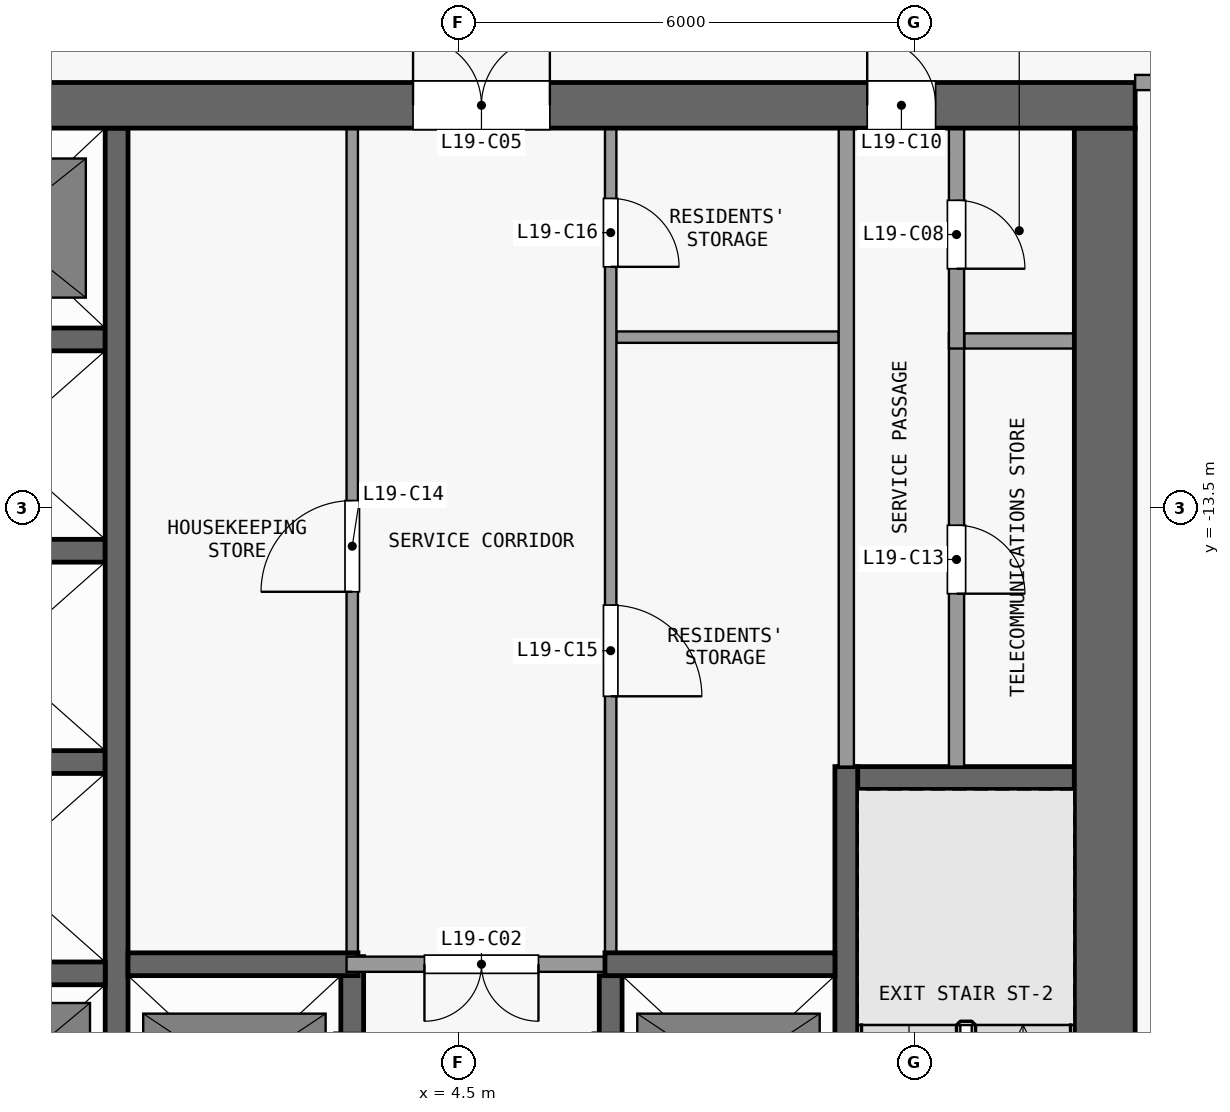
"""IFC4 building model, lengths in metres.
Left out: names, types, materials, properties, quantities, classifications, styles, units other than length and angle.
Written with IfcOpenShell. Run it as: python <this file> out.ifc"""

import sys

from ifc_helpers import new_model, si_unit, direction, frame, frame_2d, origin, place, context, subcontext, project, spatial, rectangle, extrude, element, fill, save


model = new_model("IFC4")
c1 = context("Model", 3, precision=1e-05, world=origin(), true_north=direction((0.0, 1.0)))
c2 = subcontext(c1, "Body", "Model", "MODEL_VIEW")
j1 = project(units=[si_unit("LENGTHUNIT", "METRE"), si_unit("PLANEANGLEUNIT", "RADIAN")], contexts=[c1])
p1 = place(None, origin())
s1 = spatial("IfcSite", under=j1, at=p1, CompositionType="ELEMENT")
p2 = place(p1, origin())
s2 = spatial("IfcBuilding", under=s1, at=p2, CompositionType="ELEMENT")
p3 = place(p2, frame((0.0, 0.0, 81.1)))
s3 = spatial("IfcBuildingStorey", under=s2, at=p3, CompositionType="ELEMENT", Elevation=81.1)
p4 = place(p3, frame((-13.4, -8.2, 0.0), z_axis=(0.0, 0.0, 1.0), x_axis=(1.0, 0.0, 0.0)))
e1 = element("IfcWall", 1, at=p4, inside=s3, PredefinedType="SHEAR", context=c2, shape_type="SweptSolid", body=[
    extrude(rectangle(XDim=26.8, YDim=0.6, at=frame_2d((13.4, 0.0))), origin(), (0.0, 0.0, 1.0), 3.3),
])
p5 = place(p4, frame((7.7, 0.0, 0.0)))
e2 = element("IfcOpeningElement", 2, at=p5, cuts=e1, PredefinedType="OPENING", context=c2, shape_type="SweptSolid", body=[
    extrude(rectangle(XDim=1.8, YDim=2.1, at=frame_2d((0.9, 1.05))), frame((0.0, 0.31, 0.0), z_axis=(0.0, -1.0, 0.0), x_axis=(1.0, 0.0, 0.0)), (0.0, 0.0, 1.0), 0.62),
])
p6 = place(p4, frame((17.3, 0.0, 0.0)))
e3 = element("IfcOpeningElement", 3, at=p6, cuts=e1, PredefinedType="OPENING", context=c2, shape_type="SweptSolid", body=[
    extrude(rectangle(XDim=1.8, YDim=2.1, at=frame_2d((0.9, 1.05))), frame((0.0, 0.31, 0.0), z_axis=(0.0, -1.0, 0.0), x_axis=(1.0, 0.0, 0.0)), (0.0, 0.0, 1.0), 0.62),
])
p7 = place(p4, frame((2.625, 0.0, 0.0)))
e4 = element("IfcOpeningElement", 4, at=p7, cuts=e1, PredefinedType="OPENING", context=c2, shape_type="SweptSolid", body=[
    extrude(rectangle(XDim=0.9, YDim=2.1, at=frame_2d((0.45, 1.05))), frame((0.0, 0.31, 0.0), z_axis=(0.0, -1.0, 0.0), x_axis=(1.0, 0.0, 0.0)), (0.0, 0.0, 1.0), 0.62),
])
p8 = place(p4, frame((23.275, 0.0, 0.0)))
e5 = element("IfcOpeningElement", 5, at=p8, cuts=e1, PredefinedType="OPENING", context=c2, shape_type="SweptSolid", body=[
    extrude(rectangle(XDim=0.9, YDim=2.1, at=frame_2d((0.45, 1.05))), frame((0.0, 0.31, 0.0), z_axis=(0.0, -1.0, 0.0), x_axis=(1.0, 0.0, 0.0)), (0.0, 0.0, 1.0), 0.62),
])
p9 = place(p3, frame((13.0, -24.6, 0.0), z_axis=(0.0, 0.0, 1.0), x_axis=(0.0, 1.0, 0.0)))
e6 = element("IfcWall", 6, at=p9, inside=s3, PredefinedType="SHEAR", context=c2, shape_type="SweptSolid", body=[
    extrude(rectangle(XDim=16.1, YDim=0.8, at=frame_2d((8.05, 0.0))), origin(), (0.0, 0.0, 1.0), 3.3),
])
p10 = place(p3, frame((-2.95, -19.62, 0.0), z_axis=(0.0, 0.0, 1.0), x_axis=(1.0, 0.0, 0.0)))
e7 = element("IfcWall", 7, at=p10, inside=s3, PredefinedType="SHEAR", context=c2, shape_type="SweptSolid", body=[
    extrude(rectangle(XDim=2.8, YDim=0.3, at=frame_2d((1.4, 0.0))), origin(), (0.0, 0.0, 1.0), 3.3),
])
p11 = place(p3, frame((0.15, -19.5, 0.0), z_axis=(0.0, 0.0, 1.0), x_axis=(1.0, 0.0, 0.0)))
e8 = element("IfcWall", 8, at=p11, inside=s3, PredefinedType="SHEAR", context=c2, shape_type="SweptSolid", body=[
    extrude(rectangle(XDim=3.025, YDim=0.3, at=frame_2d((1.513, 0.0))), origin(), (0.0, 0.0, 1.0), 3.3),
])
p12 = place(p3, frame((6.575, -19.5, 0.0), z_axis=(0.0, 0.0, 1.0), x_axis=(-1.0, 0.0, 0.0)))
e9 = element("IfcWall", 9, at=p12, inside=s3, PredefinedType="PARTITIONING", context=c2, shape_type="SweptSolid", body=[
    extrude(rectangle(XDim=3.55, YDim=0.2, at=frame_2d((1.775, 0.0))), origin(), (0.0, 0.0, 1.0), 3.3),
])
p13 = place(p12, frame((1.025, 0.0, 0.0)))
e10 = element("IfcOpeningElement", 10, at=p13, cuts=e9, PredefinedType="OPENING", context=c2, shape_type="SweptSolid", body=[
    extrude(rectangle(XDim=1.5, YDim=2.1, at=frame_2d((0.75, 1.05))), frame((0.0, 0.11, 0.0), z_axis=(0.0, -1.0, 0.0), x_axis=(1.0, 0.0, 0.0)), (0.0, 0.0, 1.0), 0.22),
])
p14 = place(p3, frame((6.425, -19.5, 0.0), z_axis=(0.0, 0.0, 1.0), x_axis=(1.0, 0.0, 0.0)))
e11 = element("IfcWall", 11, at=p14, inside=s3, PredefinedType="SHEAR", context=c2, shape_type="SweptSolid", body=[
    extrude(rectangle(XDim=3.025, YDim=0.3, at=frame_2d((1.512, 0.0))), origin(), (0.0, 0.0, 1.0), 3.3),
])
p15 = place(p3, frame((9.5, -17.05, 0.0), z_axis=(0.0, 0.0, 1.0), x_axis=(1.0, 0.0, 0.0)))
e12 = element("IfcWall", 12, at=p15, inside=s3, PredefinedType="SHEAR", context=c2, shape_type="SweptSolid", body=[
    extrude(rectangle(XDim=3.1, YDim=0.3, at=frame_2d((1.55, 0.0))), origin(), (0.0, 0.0, 1.0), 3.3),
])
for number, where, z_axis, x_axis in (
    (13, (-2.95, -16.84, 0.0), (0.0, 0.0, 1.0), (1.0, 0.0, 0.0)),
    (14, (-2.95, -14.06, 0.0), (0.0, 0.0, 1.0), (1.0, 0.0, 0.0)),
):
    element("IfcWall", number, at=place(p3, frame(where, z_axis=z_axis, x_axis=x_axis)), inside=s3, PredefinedType="SHEAR", context=c2, shape_type="SweptSolid", body=[
        extrude(rectangle(XDim=2.8, YDim=0.3, at=frame_2d((1.4, 0.0))), origin(), (0.0, 0.0, 1.0), 3.3),
    ])
p16 = place(p3, frame((11.15, -11.3, 0.0), z_axis=(0.0, 0.0, 1.0), x_axis=(1.0, 0.0, 0.0)))
e15 = element("IfcWall", 15, at=p16, inside=s3, PredefinedType="PARTITIONING", context=c2, shape_type="SweptSolid", body=[
    extrude(rectangle(XDim=1.45, YDim=0.2, at=frame_2d((0.725, 0.0))), origin(), (0.0, 0.0, 1.0), 3.3),
])
p17 = place(p3, frame((-2.95, -11.28, 0.0), z_axis=(0.0, 0.0, 1.0), x_axis=(1.0, 0.0, 0.0)))
e16 = element("IfcWall", 16, at=p17, inside=s3, PredefinedType="SHEAR", context=c2, shape_type="SweptSolid", body=[
    extrude(rectangle(XDim=2.8, YDim=0.3, at=frame_2d((1.4, 0.0))), origin(), (0.0, 0.0, 1.0), 3.3),
])
p18 = place(p3, frame((6.575, -11.25, 0.0), z_axis=(0.0, 0.0, 1.0), x_axis=(1.0, 0.0, 0.0)))
e17 = element("IfcWall", 17, at=p18, inside=s3, PredefinedType="PARTITIONING", context=c2, shape_type="SweptSolid", body=[
    extrude(rectangle(XDim=2.925, YDim=0.15, at=frame_2d((1.462, 0.0))), origin(), (0.0, 0.0, 1.0), 3.3),
])
p19 = place(p3, frame((0.0, -22.25, 0.0), z_axis=(0.0, 0.0, 1.0), x_axis=(0.0, 1.0, 0.0)))
e18 = element("IfcWall", 18, at=p19, inside=s3, PredefinedType="SHEAR", context=c2, shape_type="SweptSolid", body=[
    extrude(rectangle(XDim=13.75, YDim=0.3, at=frame_2d((6.875, 0.0))), origin(), (0.0, 0.0, 1.0), 3.3),
])
p20 = place(p3, frame((3.1, -22.25, 0.0), z_axis=(0.0, 0.0, 1.0), x_axis=(0.0, 1.0, 0.0)))
e19 = element("IfcWall", 19, at=p20, inside=s3, PredefinedType="SHEAR", context=c2, shape_type="SweptSolid", body=[
    extrude(rectangle(XDim=2.85, YDim=0.3, at=frame_2d((1.425, 0.0))), origin(), (0.0, 0.0, 1.0), 3.3),
])
p21 = place(p20, frame((0.75, 0.0, 0.0)))
e20 = element("IfcOpeningElement", 20, at=p21, cuts=e19, PredefinedType="OPENING", context=c2, shape_type="SweptSolid", body=[
    extrude(rectangle(XDim=1.1, YDim=2.1, at=frame_2d((0.55, 1.05))), frame((0.0, 0.16, 0.0), z_axis=(0.0, -1.0, 0.0), x_axis=(1.0, 0.0, 0.0)), (0.0, 0.0, 1.0), 0.32),
])
p22 = place(p3, frame((3.1, -19.4, 0.0), z_axis=(0.0, 0.0, 1.0), x_axis=(0.0, 1.0, 0.0)))
e21 = element("IfcWall", 21, at=p22, inside=s3, PredefinedType="PARTITIONING", context=c2, shape_type="SweptSolid", body=[
    extrude(rectangle(XDim=10.9, YDim=0.15, at=frame_2d((5.45, 0.0))), origin(), (0.0, 0.0, 1.0), 3.3),
])
p23 = place(p22, frame((4.8, 0.0, 0.0)))
e22 = element("IfcOpeningElement", 22, at=p23, cuts=e21, PredefinedType="OPENING", context=c2, shape_type="SweptSolid", body=[
    extrude(rectangle(XDim=1.2, YDim=2.1, at=frame_2d((0.6, 1.05))), frame((0.0, 0.085, 0.0), z_axis=(0.0, -1.0, 0.0), x_axis=(1.0, 0.0, 0.0)), (0.0, 0.0, 1.0), 0.17),
])
p24 = place(p3, frame((6.5, -22.25, 0.0), z_axis=(0.0, 0.0, 1.0), x_axis=(0.0, 1.0, 0.0)))
e23 = element("IfcWall", 23, at=p24, inside=s3, PredefinedType="SHEAR", context=c2, shape_type="SweptSolid", body=[
    extrude(rectangle(XDim=2.6, YDim=0.3, at=frame_2d((1.3, 0.0))), origin(), (0.0, 0.0, 1.0), 3.3),
])
p25 = place(p24, frame((0.75, 0.0, 0.0)))
e24 = element("IfcOpeningElement", 24, at=p25, cuts=e23, PredefinedType="OPENING", context=c2, shape_type="SweptSolid", body=[
    extrude(rectangle(XDim=1.1, YDim=2.1, at=frame_2d((0.55, 1.05))), frame((0.0, 0.16, 0.0), z_axis=(0.0, -1.0, 0.0), x_axis=(1.0, 0.0, 0.0)), (0.0, 0.0, 1.0), 0.32),
])
p26 = place(p3, frame((6.5, -8.5, 0.0), z_axis=(0.0, 0.0, 1.0), x_axis=(0.0, -1.0, 0.0)))
e25 = element("IfcWall", 25, at=p26, inside=s3, PredefinedType="PARTITIONING", context=c2, shape_type="SweptSolid", body=[
    extrude(rectangle(XDim=10.85, YDim=0.15, at=frame_2d((5.425, 0.0))), origin(), (0.0, 0.0, 1.0), 3.3),
])
p27 = place(p26, frame((6.275, 0.0, 0.0)))
e26 = element("IfcOpeningElement", 26, at=p27, cuts=e25, PredefinedType="OPENING", context=c2, shape_type="SweptSolid", body=[
    extrude(rectangle(XDim=1.2, YDim=2.1, at=frame_2d((0.6, 1.05))), frame((0.0, 0.085, 0.0), z_axis=(0.0, -1.0, 0.0), x_axis=(1.0, 0.0, 0.0)), (0.0, 0.0, 1.0), 0.17),
])
p28 = place(p26, frame((0.925, 0.0, 0.0)))
e27 = element("IfcOpeningElement", 27, at=p28, cuts=e25, PredefinedType="OPENING", context=c2, shape_type="SweptSolid", body=[
    extrude(rectangle(XDim=0.9, YDim=2.1, at=frame_2d((0.45, 1.05))), frame((0.0, 0.085, 0.0), z_axis=(0.0, -1.0, 0.0), x_axis=(1.0, 0.0, 0.0)), (0.0, 0.0, 1.0), 0.17),
])
p29 = place(p3, frame((9.6, -16.9, 0.0), z_axis=(0.0, 0.0, 1.0), x_axis=(0.0, -1.0, 0.0)))
e28 = element("IfcWall", 28, at=p29, inside=s3, PredefinedType="SHEAR", context=c2, shape_type="SweptSolid", body=[
    extrude(rectangle(XDim=7.7, YDim=0.3, at=frame_2d((3.85, 0.0))), origin(), (0.0, 0.0, 1.0), 3.3),
])
p30 = place(p29, frame((6.5, 0.0, 0.0)))
e29 = element("IfcOpeningElement", 29, at=p30, cuts=e28, PredefinedType="OPENING", context=c2, shape_type="SweptSolid", body=[
    extrude(rectangle(XDim=1.1, YDim=2.1, at=frame_2d((0.55, 1.05))), frame((0.0, 0.16, 0.0), z_axis=(0.0, -1.0, 0.0), x_axis=(1.0, 0.0, 0.0)), (0.0, 0.0, 1.0), 0.32),
])
p31 = place(p3, frame((9.6, -16.9, 0.0), z_axis=(0.0, 0.0, 1.0), x_axis=(0.0, 1.0, 0.0)))
e30 = element("IfcWall", 30, at=p31, inside=s3, PredefinedType="PARTITIONING", context=c2, shape_type="SweptSolid", body=[
    extrude(rectangle(XDim=8.4, YDim=0.2, at=frame_2d((4.2, 0.0))), origin(), (0.0, 0.0, 1.0), 3.3),
])
p32 = place(p3, frame((11.05, -11.2, 0.0), z_axis=(0.0, 0.0, 1.0), x_axis=(0.0, -1.0, 0.0)))
e31 = element("IfcWall", 31, at=p32, inside=s3, PredefinedType="PARTITIONING", context=c2, shape_type="SweptSolid", body=[
    extrude(rectangle(XDim=5.7, YDim=0.2, at=frame_2d((2.85, 0.0))), origin(), (0.0, 0.0, 1.0), 3.3),
])
p33 = place(p32, frame((2.525, 0.0, 0.0)))
e32 = element("IfcOpeningElement", 32, at=p33, cuts=e31, PredefinedType="OPENING", context=c2, shape_type="SweptSolid", body=[
    extrude(rectangle(XDim=0.9, YDim=2.1, at=frame_2d((0.45, 1.05))), frame((0.0, 0.11, 0.0), z_axis=(0.0, -1.0, 0.0), x_axis=(1.0, 0.0, 0.0)), (0.0, 0.0, 1.0), 0.22),
])
p34 = place(p3, frame((11.05, -8.5, 0.0), z_axis=(0.0, 0.0, 1.0), x_axis=(0.0, -1.0, 0.0)))
e33 = element("IfcWall", 33, at=p34, inside=s3, PredefinedType="PARTITIONING", context=c2, shape_type="SweptSolid", body=[
    extrude(rectangle(XDim=2.9, YDim=0.2, at=frame_2d((1.45, 0.0))), origin(), (0.0, 0.0, 1.0), 3.3),
])
p35 = place(p34, frame((0.95, 0.0, 0.0)))
e34 = element("IfcOpeningElement", 34, at=p35, cuts=e33, PredefinedType="OPENING", context=c2, shape_type="SweptSolid", body=[
    extrude(rectangle(XDim=0.9, YDim=2.1, at=frame_2d((0.45, 1.05))), frame((0.0, 0.11, 0.0), z_axis=(0.0, -1.0, 0.0), x_axis=(1.0, 0.0, 0.0)), (0.0, 0.0, 1.0), 0.22),
])
p36 = place(p3, frame((13.4, -7.9, 0.0), z_axis=(0.0, 0.0, 1.0), x_axis=(1.0, 0.0, 0.0)))
e35 = element("IfcWall", 35, at=p36, inside=s3, PredefinedType="PARTITIONING", context=c2, shape_type="SweptSolid", body=[
    extrude(rectangle(XDim=10.45, YDim=0.2, at=frame_2d((5.225, 0.0))), origin(), (0.0, 0.0, 1.0), 3.3),
])
p37 = place(p36, frame((1.0, 0.0, 0.0)))
e36 = element("IfcOpeningElement", 36, at=p37, cuts=e35, PredefinedType="OPENING", context=c2, shape_type="SweptSolid", body=[
    extrude(rectangle(XDim=1.0, YDim=2.1, at=frame_2d((0.5, 1.05))), frame((0.0, 0.11, 0.0), z_axis=(0.0, -1.0, 0.0), x_axis=(1.0, 0.0, 0.0)), (0.0, 0.0, 1.0), 0.22),
])
p38 = place(p13, origin())
e37 = element("IfcDoor", 37, at=p38, inside=s3, OperationType="DOUBLE_DOOR_SINGLE_SWING", PredefinedType="DOOR", context=c2, shape_type="SweptSolid", body=[
    extrude(rectangle(XDim=1.5, YDim=2.1, at=frame_2d((0.75, 1.05))), frame((0.0, 0.025, 0.0), z_axis=(0.0, -1.0, 0.0), x_axis=(1.0, 0.0, 0.0)), (0.0, 0.0, 1.0), 0.05),
])
fill(e10, e37)
p39 = place(p6, origin())
e38 = element("IfcDoor", 38, at=p39, inside=s3, OperationType="DOUBLE_DOOR_SINGLE_SWING", PredefinedType="DOOR", context=c2, shape_type="SweptSolid", body=[
    extrude(rectangle(XDim=1.8, YDim=2.1, at=frame_2d((0.9, 1.05))), frame((0.0, 0.025, 0.0), z_axis=(0.0, -1.0, 0.0), x_axis=(1.0, 0.0, 0.0)), (0.0, 0.0, 1.0), 0.05),
])
fill(e3, e38)
p40 = place(p35, origin())
e39 = element("IfcDoor", 39, at=p40, inside=s3, OperationType="SINGLE_SWING_RIGHT", PredefinedType="DOOR", context=c2, shape_type="SweptSolid", body=[
    extrude(rectangle(XDim=0.9, YDim=2.1, at=frame_2d((0.45, 1.05))), frame((0.0, 0.025, 0.0), z_axis=(0.0, -1.0, 0.0), x_axis=(1.0, 0.0, 0.0)), (0.0, 0.0, 1.0), 0.05),
])
fill(e34, e39)
p41 = place(p8, origin())
e40 = element("IfcDoor", 40, at=p41, inside=s3, OperationType="SINGLE_SWING_LEFT", PredefinedType="DOOR", context=c2, shape_type="SweptSolid", body=[
    extrude(rectangle(XDim=0.9, YDim=2.1, at=frame_2d((0.45, 1.05))), frame((0.0, 0.025, 0.0), z_axis=(0.0, -1.0, 0.0), x_axis=(1.0, 0.0, 0.0)), (0.0, 0.0, 1.0), 0.05),
])
fill(e5, e40)
p42 = place(p33, origin())
e41 = element("IfcDoor", 41, at=p42, inside=s3, OperationType="SINGLE_SWING_RIGHT", PredefinedType="DOOR", context=c2, shape_type="SweptSolid", body=[
    extrude(rectangle(XDim=0.9, YDim=2.1, at=frame_2d((0.45, 1.05))), frame((0.0, 0.025, 0.0), z_axis=(0.0, -1.0, 0.0), x_axis=(1.0, 0.0, 0.0)), (0.0, 0.0, 1.0), 0.05),
])
fill(e32, e41)
p43 = place(p23, origin())
e42 = element("IfcDoor", 42, at=p43, inside=s3, OperationType="SINGLE_SWING_LEFT", PredefinedType="DOOR", context=c2, shape_type="SweptSolid", body=[
    extrude(rectangle(XDim=1.2, YDim=2.1, at=frame_2d((0.6, 1.05))), frame((0.0, 0.025, 0.0), z_axis=(0.0, -1.0, 0.0), x_axis=(1.0, 0.0, 0.0)), (0.0, 0.0, 1.0), 0.05),
])
fill(e22, e42)
p44 = place(p27, origin())
e43 = element("IfcDoor", 43, at=p44, inside=s3, OperationType="SINGLE_SWING_RIGHT", PredefinedType="DOOR", context=c2, shape_type="SweptSolid", body=[
    extrude(rectangle(XDim=1.2, YDim=2.1, at=frame_2d((0.6, 1.05))), frame((0.0, 0.025, 0.0), z_axis=(0.0, -1.0, 0.0), x_axis=(1.0, 0.0, 0.0)), (0.0, 0.0, 1.0), 0.05),
])
fill(e26, e43)
p45 = place(p28, origin())
e44 = element("IfcDoor", 44, at=p45, inside=s3, OperationType="SINGLE_SWING_RIGHT", PredefinedType="DOOR", context=c2, shape_type="SweptSolid", body=[
    extrude(rectangle(XDim=0.9, YDim=2.1, at=frame_2d((0.45, 1.05))), frame((0.0, 0.025, 0.0), z_axis=(0.0, -1.0, 0.0), x_axis=(1.0, 0.0, 0.0)), (0.0, 0.0, 1.0), 0.05),
])
fill(e27, e44)
save(model, sys.argv[1])
